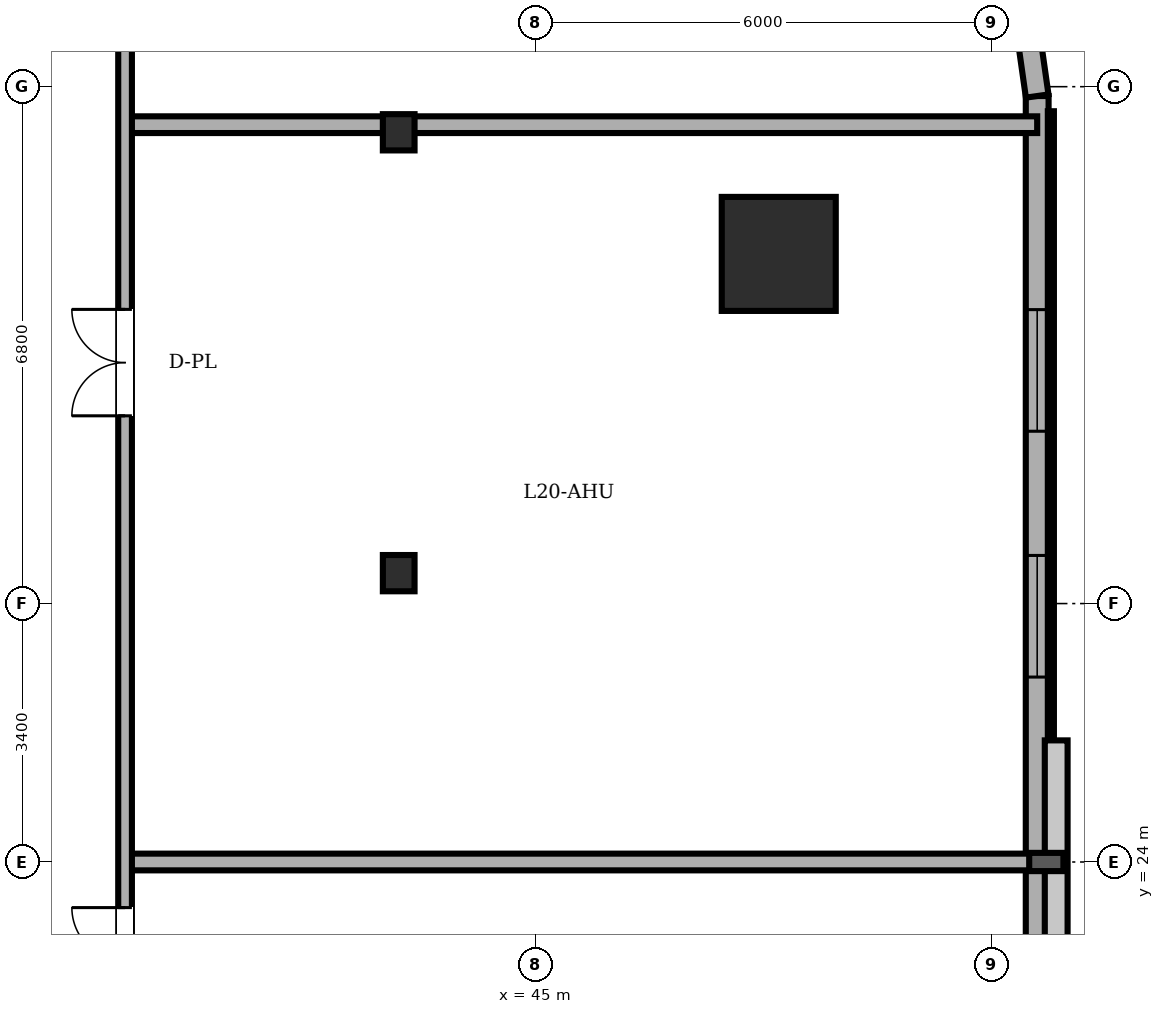
"""IFC4 building model, lengths in metres.
Left out: names, types, materials, properties, quantities, classifications, styles, units other than length and angle.
Written with IfcOpenShell. Run it as: python <this file> out.ifc"""

import sys

from ifc_helpers import new_model, si_unit, direction, frame, frame_2d, origin, origin_2d, place, context, subcontext, project, spatial, rectangle, circle, i_section, extrude, element, fill, save


model = new_model("IFC4")
c1 = context("Model", 3, precision=1e-05, world=origin(), true_north=direction((0.0, 1.0)))
c2 = subcontext(c1, "Body", "Model", "MODEL_VIEW")
j1 = project(units=[si_unit("LENGTHUNIT", "METRE"), si_unit("PLANEANGLEUNIT", "RADIAN")], contexts=[c1])
p1 = place(None, origin())
s1 = spatial("IfcSite", under=j1, at=p1, CompositionType="ELEMENT")
p2 = place(p1, origin())
s2 = spatial("IfcBuilding", under=s1, at=p2, CompositionType="ELEMENT")
p3 = place(p2, frame((0.0, 0.0, 75.6)))
s3 = spatial("IfcBuildingStorey", under=s2, at=p3, CompositionType="ELEMENT", Elevation=75.6)
p4 = place(p3, frame((48.2, 32.0, 0.0), z_axis=(0.0, 0.0, 1.0), x_axis=(1.0, 0.0, 0.0)))
e1 = element("IfcColumn", 1, at=p4, inside=s3, PredefinedType="COLUMN", context=c2, shape_type="SweptSolid", body=[
    extrude(circle(Radius=0.75, at=origin_2d()), origin(), (0.0, 0.0, 1.0), 2.96),
])
for number, where, z_axis, x_axis in (
    (2, (43.2, 27.8, 0.0), (0.0, 0.0, 1.0), (1.0, 0.0, 0.0)),
    (3, (43.2, 33.6, 0.0), (0.0, 0.0, 1.0), (1.0, 0.0, 0.0)),
):
    element("IfcColumn", number, at=place(p3, frame(where, z_axis=z_axis, x_axis=x_axis)), inside=s3, PredefinedType="COLUMN", context=c2, shape_type="SweptSolid", body=[
        extrude(i_section(OverallWidth=0.417, OverallDepth=0.477, WebThickness=0.036, FlangeThickness=0.057, FilletRadius=0.015, at=origin_2d()), origin(), (0.0, 0.0, 1.0), 2.96),
    ])
p5 = place(p3, frame((51.6, 13.923, 0.0), z_axis=(0.0, 0.0, 1.0), x_axis=(0.0, 1.0, 0.0)))
e4 = element("IfcWall", 4, at=p5, inside=s3, PredefinedType="SOLIDWALL", context=c2, shape_type="SweptSolid", body=[
    extrude(rectangle(XDim=20.154, YDim=0.3, at=frame_2d((10.077, 0.0))), origin(), (0.0, 0.0, 1.0), 5.36),
])
p6 = place(p5, frame((0.814, 0.0, 0.85)))
e5 = element("IfcOpeningElement", 5, at=p6, cuts=e4, PredefinedType="OPENING", context=c2, shape_type="SweptSolid", body=[
    extrude(rectangle(XDim=1.6, YDim=1.2, at=frame_2d((0.8, 0.6))), frame((0.0, 0.16, 0.0), z_axis=(0.0, -1.0, 0.0), x_axis=(1.0, 0.0, 0.0)), (0.0, 0.0, 1.0), 0.32),
])
p7 = place(p5, frame((3.877, 0.0, 0.85)))
e6 = element("IfcOpeningElement", 6, at=p7, cuts=e4, PredefinedType="OPENING", context=c2, shape_type="SweptSolid", body=[
    extrude(rectangle(XDim=1.6, YDim=1.2, at=frame_2d((0.8, 0.6))), frame((0.0, 0.16, 0.0), z_axis=(0.0, -1.0, 0.0), x_axis=(1.0, 0.0, 0.0)), (0.0, 0.0, 1.0), 0.32),
])
p8 = place(p5, frame((7.477, 0.0, 0.85)))
e7 = element("IfcOpeningElement", 7, at=p8, cuts=e4, PredefinedType="OPENING", context=c2, shape_type="SweptSolid", body=[
    extrude(rectangle(XDim=1.6, YDim=1.2, at=frame_2d((0.8, 0.6))), frame((0.0, 0.16, 0.0), z_axis=(0.0, -1.0, 0.0), x_axis=(1.0, 0.0, 0.0)), (0.0, 0.0, 1.0), 0.32),
])
p9 = place(p5, frame((12.51, 0.0, 0.85)))
e8 = element("IfcOpeningElement", 8, at=p9, cuts=e4, PredefinedType="OPENING", context=c2, shape_type="SweptSolid", body=[
    extrude(rectangle(XDim=1.6, YDim=1.2, at=frame_2d((0.8, 0.6))), frame((0.0, 0.16, 0.0), z_axis=(0.0, -1.0, 0.0), x_axis=(1.0, 0.0, 0.0)), (0.0, 0.0, 1.0), 0.32),
])
p10 = place(p5, frame((15.744, 0.0, 0.85)))
e9 = element("IfcOpeningElement", 9, at=p10, cuts=e4, PredefinedType="OPENING", context=c2, shape_type="SweptSolid", body=[
    extrude(rectangle(XDim=1.6, YDim=1.2, at=frame_2d((0.8, 0.6))), frame((0.0, 0.16, 0.0), z_axis=(0.0, -1.0, 0.0), x_axis=(1.0, 0.0, 0.0)), (0.0, 0.0, 1.0), 0.32),
])
p11 = place(p3, frame((51.6, 34.077, 0.0), z_axis=(0.0, 0.0, 1.0), x_axis=(-0.140380048512, 0.990097693149, 0.0)))
e10 = element("IfcWall", 10, at=p11, inside=s3, PredefinedType="SOLIDWALL", context=c2, shape_type="SweptSolid", body=[
    extrude(rectangle(XDim=1.576, YDim=0.3, at=frame_2d((0.788, 0.0))), origin(), (0.0, 0.0, 1.0), 5.36),
])
p12 = place(p3, frame((39.6, 24.0, 0.0), z_axis=(0.0, 0.0, 1.0), x_axis=(1.0, 0.0, 0.0)))
e11 = element("IfcWall", 11, at=p12, inside=s3, PredefinedType="PARTITIONING", context=c2, shape_type="SweptSolid", body=[
    extrude(rectangle(XDim=12.0, YDim=0.22, at=frame_2d((6.0, 0.0))), origin(), (0.0, 0.0, 1.0), 4.982),
])
p13 = place(p3, frame((39.6, 33.7, 0.0), z_axis=(0.0, 0.0, 1.0), x_axis=(1.0, 0.0, 0.0)))
e12 = element("IfcWall", 12, at=p13, inside=s3, PredefinedType="PARTITIONING", context=c2, shape_type="SweptSolid", body=[
    extrude(rectangle(XDim=12.0, YDim=0.22, at=frame_2d((6.0, 0.0))), origin(), (0.0, 0.0, 1.0), 2.942),
])
p14 = place(p3, frame((39.6, 11.8, 0.0), z_axis=(0.0, 0.0, 1.0), x_axis=(0.0, 1.0, 0.0)))
e13 = element("IfcWall", 13, at=p14, inside=s3, PredefinedType="PARTITIONING", context=c2, shape_type="SweptSolid", body=[
    extrude(rectangle(XDim=24.4, YDim=0.18, at=frame_2d((12.2, 0.0))), origin(), (0.0, 0.0, 1.0), 5.36),
])
p15 = place(p14, frame((18.07, 0.0, 0.0)))
e14 = element("IfcOpeningElement", 14, at=p15, cuts=e13, PredefinedType="OPENING", context=c2, shape_type="SweptSolid", body=[
    extrude(rectangle(XDim=1.4, YDim=2.25, at=frame_2d((0.7, 1.125))), frame((0.0, 0.1, 0.0), z_axis=(0.0, -1.0, 0.0), x_axis=(1.0, 0.0, 0.0)), (0.0, 0.0, 1.0), 0.2),
])
p16 = place(p14, frame((5.225, 0.0, 0.0)))
e15 = element("IfcOpeningElement", 15, at=p16, cuts=e13, PredefinedType="OPENING", context=c2, shape_type="SweptSolid", body=[
    extrude(rectangle(XDim=1.4, YDim=2.25, at=frame_2d((0.7, 1.125))), frame((0.0, 0.1, 0.0), z_axis=(0.0, -1.0, 0.0), x_axis=(1.0, 0.0, 0.0)), (0.0, 0.0, 1.0), 0.2),
])
p17 = place(p14, frame((10.2, 0.0, 0.0)))
e16 = element("IfcOpeningElement", 16, at=p17, cuts=e13, PredefinedType="OPENING", context=c2, shape_type="SweptSolid", body=[
    extrude(rectangle(XDim=1.4, YDim=2.25, at=frame_2d((0.7, 1.125))), frame((0.0, 0.1, 0.0), z_axis=(0.0, -1.0, 0.0), x_axis=(1.0, 0.0, 0.0)), (0.0, 0.0, 1.0), 0.2),
])
p18 = place(p9, origin())
e17 = element("IfcWindow", 17, at=p18, inside=s3, PartitioningType="DOUBLE_PANEL_VERTICAL", PredefinedType="WINDOW", context=c2, shape_type="SweptSolid", body=[
    extrude(rectangle(XDim=1.6, YDim=1.2, at=frame_2d((0.8, 0.6))), frame((0.0, 0.03, 0.0), z_axis=(0.0, -1.0, 0.0), x_axis=(1.0, 0.0, 0.0)), (0.0, 0.0, 1.0), 0.06),
])
fill(e8, e17)
p19 = place(p10, origin())
e18 = element("IfcWindow", 18, at=p19, inside=s3, PartitioningType="DOUBLE_PANEL_VERTICAL", PredefinedType="WINDOW", context=c2, shape_type="SweptSolid", body=[
    extrude(rectangle(XDim=1.6, YDim=1.2, at=frame_2d((0.8, 0.6))), frame((0.0, 0.03, 0.0), z_axis=(0.0, -1.0, 0.0), x_axis=(1.0, 0.0, 0.0)), (0.0, 0.0, 1.0), 0.06),
])
fill(e9, e18)
p20 = place(p15, origin())
e19 = element("IfcDoor", 19, at=p20, inside=s3, OperationType="DOUBLE_DOOR_SINGLE_SWING", PredefinedType="DOOR", context=c2, shape_type="SweptSolid", body=[
    extrude(rectangle(XDim=1.4, YDim=2.25, at=frame_2d((0.7, 1.125))), frame((0.0, 0.025, 0.0), z_axis=(0.0, -1.0, 0.0), x_axis=(1.0, 0.0, 0.0)), (0.0, 0.0, 1.0), 0.05),
])
fill(e14, e19)
p21 = place(p17, origin())
e20 = element("IfcDoor", 20, at=p21, inside=s3, OperationType="DOUBLE_DOOR_SINGLE_SWING", PredefinedType="DOOR", context=c2, shape_type="SweptSolid", body=[
    extrude(rectangle(XDim=1.4, YDim=2.25, at=frame_2d((0.7, 1.125))), frame((0.0, 0.025, 0.0), z_axis=(0.0, -1.0, 0.0), x_axis=(1.0, 0.0, 0.0)), (0.0, 0.0, 1.0), 0.05),
])
fill(e16, e20)
save(model, sys.argv[1])
